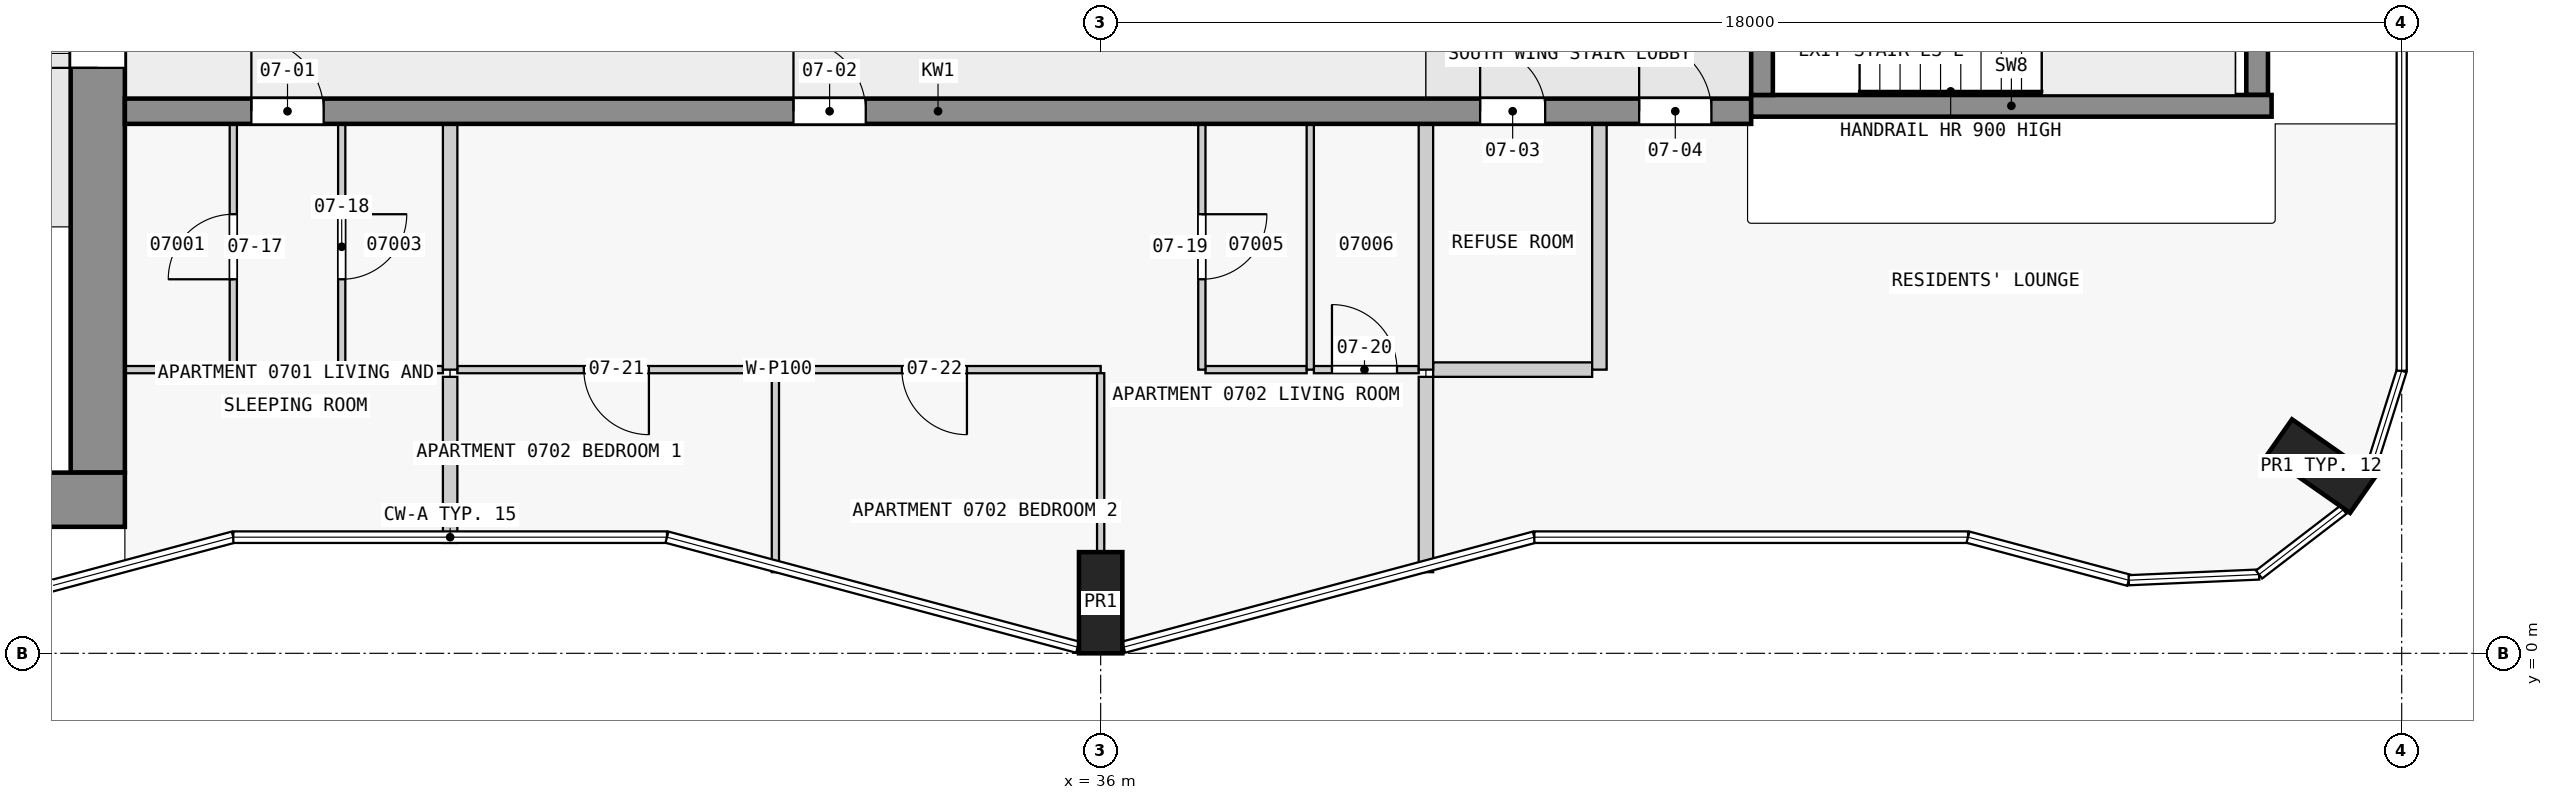
"""IFC4 building model, lengths in metres.
Left out: names, types, materials, properties, quantities, classifications, styles, units other than length and angle.
Written with IfcOpenShell. Run it as: python <this file> out.ifc"""

import sys

from ifc_helpers import new_model, si_unit, direction, frame, frame_2d, origin, origin_2d, place, context, subcontext, project, spatial, rectangle, extrude, element, fill, save


model = new_model("IFC4")
c1 = context("Model", 3, precision=1e-05, world=origin(), true_north=direction((0.0, 1.0)))
c2 = subcontext(c1, "Body", "Model", "MODEL_VIEW")
j1 = project(units=[si_unit("LENGTHUNIT", "METRE"), si_unit("PLANEANGLEUNIT", "RADIAN")], contexts=[c1])
p1 = place(None, origin())
s1 = spatial("IfcSite", under=j1, at=p1, CompositionType="ELEMENT")
p2 = place(p1, origin())
s2 = spatial("IfcBuilding", under=s1, at=p2, CompositionType="ELEMENT")
p3 = place(p2, frame((0.0, 0.0, 33.8)))
s3 = spatial("IfcBuildingStorey", under=s2, at=p3, CompositionType="ELEMENT", Elevation=33.8)
for number, where, z_axis, x_axis in (
    (1, (36.0, 0.7, 0.0), (0.0, 0.0, 1.0), (1.0, 0.0, 0.0)),
    (2, (52.884, 2.59, 0.0), (0.0, 0.0, 1.0), (0.574, 0.819, 0.0)),
):
    element("IfcColumn", number, at=place(p3, frame(where, z_axis=z_axis, x_axis=x_axis)), inside=s3, PredefinedType="COLUMN", context=c2, shape_type="SweptSolid", body=[
        extrude(rectangle(XDim=0.6, YDim=1.4, at=origin_2d()), origin(), (0.0, 0.0, 1.0), 3.5),
    ])
p4 = place(p3, frame((1.55, 2.125, 0.0), z_axis=(0.0, 0.0, 1.0), x_axis=(1.0, 0.0, 0.0)))
e3 = element("IfcWall", 3, at=p4, inside=s3, PredefinedType="SHEAR", context=c2, shape_type="SweptSolid", body=[
    extrude(rectangle(XDim=20.95, YDim=0.75, at=frame_2d((10.475, 0.0))), origin(), (0.0, 0.0, 1.0), 3.25),
])
p5 = place(p3, frame((22.125, 2.5, 0.0), z_axis=(0.0, 0.0, 1.0), x_axis=(0.0, 1.0, 0.0)))
e4 = element("IfcWall", 4, at=p5, inside=s3, PredefinedType="SHEAR", context=c2, shape_type="SweptSolid", body=[
    extrude(rectangle(XDim=14.75, YDim=0.75, at=frame_2d((7.375, 0.0))), origin(), (0.0, 0.0, 1.0), 3.25),
])
p6 = place(p5, frame((5.6, 0.0, 0.0)))
e5 = element("IfcOpeningElement", 5, at=p6, cuts=e4, PredefinedType="OPENING", context=c2, shape_type="SweptSolid", body=[
    extrude(rectangle(XDim=1.8, YDim=2.1, at=frame_2d((0.9, 1.05))), frame((0.0, 0.385, 0.0), z_axis=(0.0, -1.0, 0.0), x_axis=(1.0, 0.0, 0.0)), (0.0, 0.0, 1.0), 0.77),
])
p7 = place(p3, frame((45.15, 7.725, 0.0), z_axis=(0.0, 0.0, 1.0), x_axis=(0.0, 1.0, 0.0)))
e6 = element("IfcWall", 6, at=p7, inside=s3, PredefinedType="SHEAR", context=c2, shape_type="SweptSolid", body=[
    extrude(rectangle(XDim=2.55, YDim=0.3, at=frame_2d((1.275, 0.0))), origin(), (0.0, 0.0, 1.0), 3.5),
])
p8 = place(p7, frame((0.725, 0.0, 0.0)))
e7 = element("IfcOpeningElement", 7, at=p8, cuts=e6, PredefinedType="OPENING", context=c2, shape_type="SweptSolid", body=[
    extrude(rectangle(XDim=1.1, YDim=2.1, at=frame_2d((0.55, 1.05))), frame((0.0, 0.16, 0.0), z_axis=(0.0, -1.0, 0.0), x_axis=(1.0, 0.0, 0.0)), (0.0, 0.0, 1.0), 0.32),
])
p9 = place(p3, frame((52.0, 7.725, 0.0), z_axis=(0.0, 0.0, 1.0), x_axis=(0.0, 1.0, 0.0)))
e8 = element("IfcWall", 8, at=p9, inside=s3, PredefinedType="SHEAR", context=c2, shape_type="SweptSolid", body=[
    extrude(rectangle(XDim=2.55, YDim=0.3, at=frame_2d((1.275, 0.0))), origin(), (0.0, 0.0, 1.0), 3.5),
])
p10 = place(p3, frame((45.0, 7.575, 0.0), z_axis=(0.0, 0.0, 1.0), x_axis=(1.0, 0.0, 0.0)))
e9 = element("IfcWall", 9, at=p10, inside=s3, PredefinedType="SHEAR", context=c2, shape_type="SweptSolid", body=[
    extrude(rectangle(XDim=7.2, YDim=0.3, at=frame_2d((3.6, 0.0))), origin(), (0.0, 0.0, 1.0), 3.5),
])
p11 = place(p3, frame((22.5, 7.5, 0.0), z_axis=(0.0, 0.0, 1.0), x_axis=(1.0, 0.0, 0.0)))
e10 = element("IfcWall", 10, at=p11, inside=s3, PredefinedType="SHEAR", context=c2, shape_type="SweptSolid", body=[
    extrude(rectangle(XDim=22.5, YDim=0.35, at=frame_2d((11.25, 0.0))), origin(), (0.0, 0.0, 1.0), 3.25),
])
p12 = place(p11, frame((1.75, 0.0, 0.0)))
e11 = element("IfcOpeningElement", 11, at=p12, cuts=e10, PredefinedType="OPENING", context=c2, shape_type="SweptSolid", body=[
    extrude(rectangle(XDim=1.0, YDim=2.1, at=frame_2d((0.5, 1.05))), frame((0.0, 0.185, 0.0), z_axis=(0.0, -1.0, 0.0), x_axis=(1.0, 0.0, 0.0)), (0.0, 0.0, 1.0), 0.37),
])
p13 = place(p11, frame((9.25, 0.0, 0.0)))
e12 = element("IfcOpeningElement", 12, at=p13, cuts=e10, PredefinedType="OPENING", context=c2, shape_type="SweptSolid", body=[
    extrude(rectangle(XDim=1.0, YDim=2.1, at=frame_2d((0.5, 1.05))), frame((0.0, 0.185, 0.0), z_axis=(0.0, -1.0, 0.0), x_axis=(1.0, 0.0, 0.0)), (0.0, 0.0, 1.0), 0.37),
])
p14 = place(p11, frame((18.75, 0.0, 0.0)))
e13 = element("IfcOpeningElement", 13, at=p14, cuts=e10, PredefinedType="OPENING", context=c2, shape_type="SweptSolid", body=[
    extrude(rectangle(XDim=0.9, YDim=2.1, at=frame_2d((0.45, 1.05))), frame((0.0, 0.185, 0.0), z_axis=(0.0, -1.0, 0.0), x_axis=(1.0, 0.0, 0.0)), (0.0, 0.0, 1.0), 0.37),
])
p15 = place(p11, frame((20.95, 0.0, 0.0)))
e14 = element("IfcOpeningElement", 14, at=p15, cuts=e10, PredefinedType="OPENING", context=c2, shape_type="SweptSolid", body=[
    extrude(rectangle(XDim=1.0, YDim=2.1, at=frame_2d((0.5, 1.05))), frame((0.0, 0.185, 0.0), z_axis=(0.0, -1.0, 0.0), x_axis=(1.0, 0.0, 0.0)), (0.0, 0.0, 1.0), 0.37),
])
p16 = place(p3, frame((36.0, 3.925, 0.0), z_axis=(0.0, 0.0, 1.0), x_axis=(-1.0, 0.0, 0.0)))
e15 = element("IfcWall", 15, at=p16, inside=s3, PredefinedType="PARTITIONING", context=c2, shape_type="SweptSolid", body=[
    extrude(rectangle(XDim=8.9, YDim=0.1, at=frame_2d((4.45, 0.0))), origin(), (0.0, 0.0, 1.0), 3.25),
])
p17 = place(p16, frame((6.25, 0.0, 0.0)))
e16 = element("IfcOpeningElement", 16, at=p17, cuts=e15, PredefinedType="OPENING", context=c2, shape_type="SweptSolid", body=[
    extrude(rectangle(XDim=0.9, YDim=2.1, at=frame_2d((0.45, 1.05))), frame((0.0, 0.06, 0.0), z_axis=(0.0, -1.0, 0.0), x_axis=(1.0, 0.0, 0.0)), (0.0, 0.0, 1.0), 0.12),
])
p18 = place(p16, frame((1.85, 0.0, 0.0)))
e17 = element("IfcOpeningElement", 17, at=p18, cuts=e15, PredefinedType="OPENING", context=c2, shape_type="SweptSolid", body=[
    extrude(rectangle(XDim=0.9, YDim=2.1, at=frame_2d((0.45, 1.05))), frame((0.0, 0.06, 0.0), z_axis=(0.0, -1.0, 0.0), x_axis=(1.0, 0.0, 0.0)), (0.0, 0.0, 1.0), 0.12),
])
p19 = place(p3, frame((22.5, 3.925, 0.0), z_axis=(0.0, 0.0, 1.0), x_axis=(1.0, 0.0, 0.0)))
e18 = element("IfcWall", 18, at=p19, inside=s3, PredefinedType="PARTITIONING", context=c2, shape_type="SweptSolid", body=[
    extrude(rectangle(XDim=1.45, YDim=0.1, at=frame_2d((0.725, 0.0))), origin(), (0.0, 0.0, 1.0), 3.25),
])
p20 = place(p3, frame((25.55, 3.925, 0.0), z_axis=(0.0, 0.0, 1.0), x_axis=(1.0, 0.0, 0.0)))
e19 = element("IfcWall", 19, at=p20, inside=s3, PredefinedType="PARTITIONING", context=c2, shape_type="SweptSolid", body=[
    extrude(rectangle(XDim=1.35, YDim=0.1, at=frame_2d((0.675, 0.0))), origin(), (0.0, 0.0, 1.0), 3.25),
])
p21 = place(p3, frame((37.45, 3.925, 0.0), z_axis=(0.0, 0.0, 1.0), x_axis=(1.0, 0.0, 0.0)))
e20 = element("IfcWall", 20, at=p21, inside=s3, PredefinedType="PARTITIONING", context=c2, shape_type="SweptSolid", body=[
    extrude(rectangle(XDim=1.4, YDim=0.1, at=frame_2d((0.7, 0.0))), origin(), (0.0, 0.0, 1.0), 3.25),
])
p22 = place(p3, frame((38.95, 3.925, 0.0), z_axis=(0.0, 0.0, 1.0), x_axis=(1.0, 0.0, 0.0)))
e21 = element("IfcWall", 21, at=p22, inside=s3, PredefinedType="PARTITIONING", context=c2, shape_type="SweptSolid", body=[
    extrude(rectangle(XDim=1.45, YDim=0.1, at=frame_2d((0.725, 0.0))), origin(), (0.0, 0.0, 1.0), 3.25),
])
p23 = place(p22, frame((0.25, 0.0, 0.0)))
e22 = element("IfcOpeningElement", 22, at=p23, cuts=e21, PredefinedType="OPENING", context=c2, shape_type="SweptSolid", body=[
    extrude(rectangle(XDim=0.9, YDim=2.1, at=frame_2d((0.45, 1.05))), frame((0.0, 0.06, 0.0), z_axis=(0.0, -1.0, 0.0), x_axis=(1.0, 0.0, 0.0)), (0.0, 0.0, 1.0), 0.12),
])
p24 = place(p3, frame((40.6, 3.925, 0.0), z_axis=(0.0, 0.0, 1.0), x_axis=(1.0, 0.0, 0.0)))
e23 = element("IfcWall", 23, at=p24, inside=s3, PredefinedType="PARTITIONING", context=c2, shape_type="SweptSolid", body=[
    extrude(rectangle(XDim=2.2, YDim=0.2, at=frame_2d((1.1, 0.0))), origin(), (0.0, 0.0, 1.0), 3.25),
])
p25 = place(p3, frame((24.0, 3.925, 0.0), z_axis=(0.0, 0.0, 1.0), x_axis=(0.0, 1.0, 0.0)))
e24 = element("IfcWall", 24, at=p25, inside=s3, PredefinedType="PARTITIONING", context=c2, shape_type="SweptSolid", body=[
    extrude(rectangle(XDim=3.4, YDim=0.1, at=frame_2d((1.7, 0.0))), origin(), (0.0, 0.0, 1.0), 3.25),
])
p26 = place(p25, frame((1.25, 0.0, 0.0)))
e25 = element("IfcOpeningElement", 25, at=p26, cuts=e24, PredefinedType="OPENING", context=c2, shape_type="SweptSolid", body=[
    extrude(rectangle(XDim=0.9, YDim=2.1, at=frame_2d((0.45, 1.05))), frame((0.0, 0.06, 0.0), z_axis=(0.0, -1.0, 0.0), x_axis=(1.0, 0.0, 0.0)), (0.0, 0.0, 1.0), 0.12),
])
p27 = place(p3, frame((25.5, 7.325, 0.0), z_axis=(0.0, 0.0, 1.0), x_axis=(0.0, -1.0, 0.0)))
e26 = element("IfcWall", 26, at=p27, inside=s3, PredefinedType="PARTITIONING", context=c2, shape_type="SweptSolid", body=[
    extrude(rectangle(XDim=3.4, YDim=0.1, at=frame_2d((1.7, 0.0))), origin(), (0.0, 0.0, 1.0), 3.25),
])
p28 = place(p27, frame((1.25, 0.0, 0.0)))
e27 = element("IfcOpeningElement", 27, at=p28, cuts=e26, PredefinedType="OPENING", context=c2, shape_type="SweptSolid", body=[
    extrude(rectangle(XDim=0.9, YDim=2.1, at=frame_2d((0.45, 1.05))), frame((0.0, 0.06, 0.0), z_axis=(0.0, -1.0, 0.0), x_axis=(1.0, 0.0, 0.0)), (0.0, 0.0, 1.0), 0.12),
])
p29 = place(p3, frame((27.0, 3.825, 0.0), z_axis=(0.0, 0.0, 1.0), x_axis=(0.0, -1.0, 0.0)))
e28 = element("IfcWall", 28, at=p29, inside=s3, PredefinedType="PARTITIONING", context=c2, shape_type="SweptSolid", body=[
    extrude(rectangle(XDim=2.298, YDim=0.2, at=frame_2d((1.149, 0.0))), origin(), (0.0, 0.0, 1.0), 3.25),
])
p30 = place(p3, frame((27.0, 3.925, 0.0), z_axis=(0.0, 0.0, 1.0), x_axis=(0.0, 1.0, 0.0)))
e29 = element("IfcWall", 29, at=p30, inside=s3, PredefinedType="PARTITIONING", context=c2, shape_type="SweptSolid", body=[
    extrude(rectangle(XDim=3.4, YDim=0.2, at=frame_2d((1.7, 0.0))), origin(), (0.0, 0.0, 1.0), 3.25),
])
p31 = place(p3, frame((31.5, 1.122, 0.0), z_axis=(0.0, 0.0, 1.0), x_axis=(0.0, 1.0, 0.0)))
e30 = element("IfcWall", 30, at=p31, inside=s3, PredefinedType="PARTITIONING", context=c2, shape_type="SweptSolid", body=[
    extrude(rectangle(XDim=2.753, YDim=0.1, at=frame_2d((1.376, 0.0))), origin(), (0.0, 0.0, 1.0), 3.25),
])
p32 = place(p3, frame((36.0, 1.4, 0.0), z_axis=(0.0, 0.0, 1.0), x_axis=(0.0, 1.0, 0.0)))
e31 = element("IfcWall", 31, at=p32, inside=s3, PredefinedType="PARTITIONING", context=c2, shape_type="SweptSolid", body=[
    extrude(rectangle(XDim=2.475, YDim=0.1, at=frame_2d((1.238, 0.0))), origin(), (0.0, 0.0, 1.0), 3.25),
])
p33 = place(p3, frame((37.4, 7.325, 0.0), z_axis=(0.0, 0.0, 1.0), x_axis=(0.0, -1.0, 0.0)))
e32 = element("IfcWall", 32, at=p33, inside=s3, PredefinedType="PARTITIONING", context=c2, shape_type="SweptSolid", body=[
    extrude(rectangle(XDim=3.4, YDim=0.1, at=frame_2d((1.7, 0.0))), origin(), (0.0, 0.0, 1.0), 3.25),
])
p34 = place(p33, frame((1.25, 0.0, 0.0)))
e33 = element("IfcOpeningElement", 33, at=p34, cuts=e32, PredefinedType="OPENING", context=c2, shape_type="SweptSolid", body=[
    extrude(rectangle(XDim=0.9, YDim=2.1, at=frame_2d((0.45, 1.05))), frame((0.0, 0.06, 0.0), z_axis=(0.0, -1.0, 0.0), x_axis=(1.0, 0.0, 0.0)), (0.0, 0.0, 1.0), 0.12),
])
p35 = place(p3, frame((38.9, 3.925, 0.0), z_axis=(0.0, 0.0, 1.0), x_axis=(0.0, 1.0, 0.0)))
e34 = element("IfcWall", 34, at=p35, inside=s3, PredefinedType="PARTITIONING", context=c2, shape_type="SweptSolid", body=[
    extrude(rectangle(XDim=3.4, YDim=0.1, at=frame_2d((1.7, 0.0))), origin(), (0.0, 0.0, 1.0), 3.25),
])
p36 = place(p3, frame((40.5, 3.825, 0.0), z_axis=(0.0, 0.0, 1.0), x_axis=(0.0, -1.0, 0.0)))
e35 = element("IfcWall", 35, at=p36, inside=s3, PredefinedType="PARTITIONING", context=c2, shape_type="SweptSolid", body=[
    extrude(rectangle(XDim=2.703, YDim=0.2, at=frame_2d((1.351, 0.0))), origin(), (0.0, 0.0, 1.0), 3.25),
])
for number, where, z_axis, x_axis in (
    (36, (40.5, 3.925, 0.0), (0.0, 0.0, 1.0), (0.0, 1.0, 0.0)),
    (37, (42.9, 3.925, 0.0), (0.0, 0.0, 1.0), (0.0, 1.0, 0.0)),
):
    element("IfcWall", number, at=place(p3, frame(where, z_axis=z_axis, x_axis=x_axis)), inside=s3, PredefinedType="PARTITIONING", context=c2, shape_type="SweptSolid", body=[
        extrude(rectangle(XDim=3.4, YDim=0.2, at=frame_2d((1.7, 0.0))), origin(), (0.0, 0.0, 1.0), 3.25),
    ])
p37 = place(p6, origin())
e38 = element("IfcDoor", 38, at=p37, inside=s3, OperationType="DOUBLE_DOOR_SINGLE_SWING", PredefinedType="DOOR", context=c2, shape_type="SweptSolid", body=[
    extrude(rectangle(XDim=1.8, YDim=2.1, at=frame_2d((0.9, 1.05))), frame((0.0, 0.025, 0.0), z_axis=(0.0, -1.0, 0.0), x_axis=(1.0, 0.0, 0.0)), (0.0, 0.0, 1.0), 0.05),
])
fill(e5, e38)
p38 = place(p12, origin())
e39 = element("IfcDoor", 39, at=p38, inside=s3, OperationType="SINGLE_SWING_LEFT", PredefinedType="DOOR", context=c2, shape_type="SweptSolid", body=[
    extrude(rectangle(XDim=1.0, YDim=2.1, at=frame_2d((0.5, 1.05))), frame((0.0, 0.025, 0.0), z_axis=(0.0, -1.0, 0.0), x_axis=(1.0, 0.0, 0.0)), (0.0, 0.0, 1.0), 0.05),
])
fill(e11, e39)
p39 = place(p13, origin())
e40 = element("IfcDoor", 40, at=p39, inside=s3, OperationType="SINGLE_SWING_LEFT", PredefinedType="DOOR", context=c2, shape_type="SweptSolid", body=[
    extrude(rectangle(XDim=1.0, YDim=2.1, at=frame_2d((0.5, 1.05))), frame((0.0, 0.025, 0.0), z_axis=(0.0, -1.0, 0.0), x_axis=(1.0, 0.0, 0.0)), (0.0, 0.0, 1.0), 0.05),
])
fill(e12, e40)
p40 = place(p14, origin())
e41 = element("IfcDoor", 41, at=p40, inside=s3, OperationType="SINGLE_SWING_RIGHT", PredefinedType="DOOR", context=c2, shape_type="SweptSolid", body=[
    extrude(rectangle(XDim=0.9, YDim=2.1, at=frame_2d((0.45, 1.05))), frame((0.0, 0.025, 0.0), z_axis=(0.0, -1.0, 0.0), x_axis=(1.0, 0.0, 0.0)), (0.0, 0.0, 1.0), 0.05),
])
fill(e13, e41)
p41 = place(p15, origin())
e42 = element("IfcDoor", 42, at=p41, inside=s3, OperationType="SINGLE_SWING_RIGHT", PredefinedType="DOOR", context=c2, shape_type="SweptSolid", body=[
    extrude(rectangle(XDim=1.0, YDim=2.1, at=frame_2d((0.5, 1.05))), frame((0.0, 0.025, 0.0), z_axis=(0.0, -1.0, 0.0), x_axis=(1.0, 0.0, 0.0)), (0.0, 0.0, 1.0), 0.05),
])
fill(e14, e42)
p42 = place(p26, origin())
e43 = element("IfcDoor", 43, at=p42, inside=s3, OperationType="SINGLE_SWING_LEFT", PredefinedType="DOOR", context=c2, shape_type="SweptSolid", body=[
    extrude(rectangle(XDim=0.9, YDim=2.1, at=frame_2d((0.45, 1.05))), frame((0.0, 0.025, 0.0), z_axis=(0.0, -1.0, 0.0), x_axis=(1.0, 0.0, 0.0)), (0.0, 0.0, 1.0), 0.05),
])
fill(e25, e43)
p43 = place(p28, origin())
e44 = element("IfcDoor", 44, at=p43, inside=s3, OperationType="SINGLE_SWING_LEFT", PredefinedType="DOOR", context=c2, shape_type="SweptSolid", body=[
    extrude(rectangle(XDim=0.9, YDim=2.1, at=frame_2d((0.45, 1.05))), frame((0.0, 0.025, 0.0), z_axis=(0.0, -1.0, 0.0), x_axis=(1.0, 0.0, 0.0)), (0.0, 0.0, 1.0), 0.05),
])
fill(e27, e44)
p44 = place(p34, origin())
e45 = element("IfcDoor", 45, at=p44, inside=s3, OperationType="SINGLE_SWING_LEFT", PredefinedType="DOOR", context=c2, shape_type="SweptSolid", body=[
    extrude(rectangle(XDim=0.9, YDim=2.1, at=frame_2d((0.45, 1.05))), frame((0.0, 0.025, 0.0), z_axis=(0.0, -1.0, 0.0), x_axis=(1.0, 0.0, 0.0)), (0.0, 0.0, 1.0), 0.05),
])
fill(e33, e45)
p45 = place(p23, origin())
e46 = element("IfcDoor", 46, at=p45, inside=s3, OperationType="SINGLE_SWING_LEFT", PredefinedType="DOOR", context=c2, shape_type="SweptSolid", body=[
    extrude(rectangle(XDim=0.9, YDim=2.1, at=frame_2d((0.45, 1.05))), frame((0.0, 0.025, 0.0), z_axis=(0.0, -1.0, 0.0), x_axis=(1.0, 0.0, 0.0)), (0.0, 0.0, 1.0), 0.05),
])
fill(e22, e46)
p46 = place(p17, origin())
e47 = element("IfcDoor", 47, at=p46, inside=s3, OperationType="SINGLE_SWING_RIGHT", PredefinedType="DOOR", context=c2, shape_type="SweptSolid", body=[
    extrude(rectangle(XDim=0.9, YDim=2.1, at=frame_2d((0.45, 1.05))), frame((0.0, 0.025, 0.0), z_axis=(0.0, -1.0, 0.0), x_axis=(1.0, 0.0, 0.0)), (0.0, 0.0, 1.0), 0.05),
])
fill(e16, e47)
p47 = place(p18, origin())
e48 = element("IfcDoor", 48, at=p47, inside=s3, OperationType="SINGLE_SWING_LEFT", PredefinedType="DOOR", context=c2, shape_type="SweptSolid", body=[
    extrude(rectangle(XDim=0.9, YDim=2.1, at=frame_2d((0.45, 1.05))), frame((0.0, 0.025, 0.0), z_axis=(0.0, -1.0, 0.0), x_axis=(1.0, 0.0, 0.0)), (0.0, 0.0, 1.0), 0.05),
])
fill(e17, e48)
save(model, sys.argv[1])
